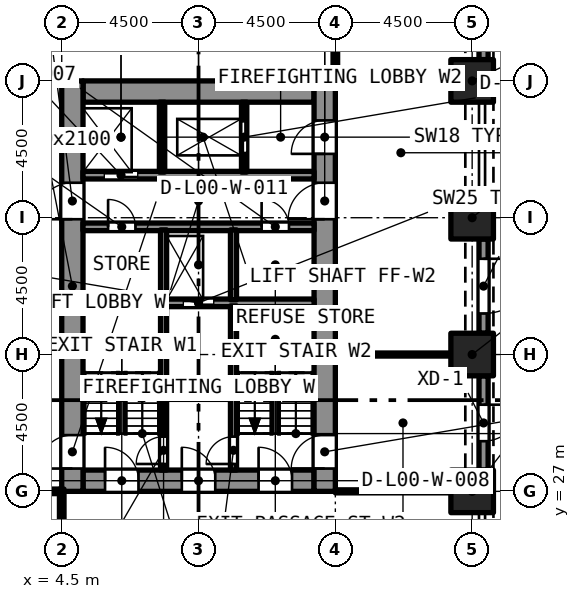
"""IFC4 building model, lengths in metres.
Left out: names, types, materials, properties, quantities, classifications, styles, units other than length and angle.
Written with IfcOpenShell. Run it as: python <this file> out.ifc"""

import sys

from ifc_helpers import new_model, si_unit, direction, frame, frame_2d, origin, origin_2d, place, context, subcontext, project, spatial, rectangle, extrude, element, fill, save


model = new_model("IFC4")
c1 = context("Model", 3, precision=1e-05, world=origin(), true_north=direction((0.0, 1.0)))
c2 = subcontext(c1, "Body", "Model", "MODEL_VIEW")
j1 = project(units=[si_unit("LENGTHUNIT", "METRE"), si_unit("PLANEANGLEUNIT", "RADIAN")], contexts=[c1])
p1 = place(None, origin())
s1 = spatial("IfcSite", under=j1, at=p1, CompositionType="ELEMENT")
p2 = place(p1, origin())
s2 = spatial("IfcBuilding", under=s1, at=p2, CompositionType="ELEMENT")
p3 = place(p2, origin())
s3 = spatial("IfcBuildingStorey", under=s2, at=p3, CompositionType="ELEMENT", Elevation=0.0)
for number, where, z_axis, x_axis in (
    (1, (18.0, 27.0, -0.3), (0.0, 0.0, 1.0), (1.0, 0.0, 0.0)),
    (2, (18.0, 31.5, -0.3), (0.0, 0.0, 1.0), (1.0, 0.0, 0.0)),
    (3, (18.0, 36.0, -0.3), (0.0, 0.0, 1.0), (1.0, 0.0, 0.0)),
    (4, (18.0, 40.5, -0.3), (0.0, 0.0, 1.0), (1.0, 0.0, 0.0)),
):
    element("IfcColumn", number, at=place(p3, frame(where, z_axis=z_axis, x_axis=x_axis)), inside=s3, PredefinedType="COLUMN", context=c2, shape_type="SweptSolid", body=[
        extrude(rectangle(XDim=1.4, YDim=1.4, at=origin_2d()), origin(), (0.0, 0.0, 1.0), 6.3),
    ])
p4 = place(p3, frame((5.2, 27.35, -0.3), z_axis=(0.0, 0.0, 1.0), x_axis=(1.0, 0.0, 0.0)))
e5 = element("IfcWall", 5, at=p4, inside=s3, PredefinedType="SOLIDWALL", context=c2, shape_type="SweptSolid", body=[
    extrude(rectangle(XDim=7.6, YDim=0.7, at=frame_2d((3.8, 0.0))), origin(), (0.0, 0.0, 1.0), 6.3),
])
p5 = place(p4, frame((0.725, 0.0, 0.3)))
e6 = element("IfcOpeningElement", 6, at=p5, cuts=e5, PredefinedType="OPENING", context=c2, shape_type="SweptSolid", body=[
    extrude(rectangle(XDim=1.1, YDim=2.1, at=frame_2d((0.55, 1.05))), frame((0.0, 0.36, 0.0), z_axis=(0.0, -1.0, 0.0), x_axis=(1.0, 0.0, 0.0)), (0.0, 0.0, 1.0), 0.72),
])
p6 = place(p4, frame((3.25, 0.0, 0.3)))
e7 = element("IfcOpeningElement", 7, at=p6, cuts=e5, PredefinedType="OPENING", context=c2, shape_type="SweptSolid", body=[
    extrude(rectangle(XDim=1.1, YDim=2.1, at=frame_2d((0.55, 1.05))), frame((0.0, 0.36, 0.0), z_axis=(0.0, -1.0, 0.0), x_axis=(1.0, 0.0, 0.0)), (0.0, 0.0, 1.0), 0.72),
])
p7 = place(p4, frame((5.775, 0.0, 0.3)))
e8 = element("IfcOpeningElement", 8, at=p7, cuts=e5, PredefinedType="OPENING", context=c2, shape_type="SweptSolid", body=[
    extrude(rectangle(XDim=1.1, YDim=2.1, at=frame_2d((0.55, 1.05))), frame((0.0, 0.36, 0.0), z_axis=(0.0, -1.0, 0.0), x_axis=(1.0, 0.0, 0.0)), (0.0, 0.0, 1.0), 0.72),
])
p8 = place(p3, frame((5.2, 40.15, -0.3), z_axis=(0.0, 0.0, 1.0), x_axis=(1.0, 0.0, 0.0)))
e9 = element("IfcWall", 9, at=p8, inside=s3, PredefinedType="SOLIDWALL", context=c2, shape_type="SweptSolid", body=[
    extrude(rectangle(XDim=7.6, YDim=0.7, at=frame_2d((3.8, 0.0))), origin(), (0.0, 0.0, 1.0), 6.3),
])
p9 = place(p3, frame((4.85, 27.0, -0.3), z_axis=(0.0, 0.0, 1.0), x_axis=(0.0, 1.0, 0.0)))
e10 = element("IfcWall", 10, at=p9, inside=s3, PredefinedType="SOLIDWALL", context=c2, shape_type="SweptSolid", body=[
    extrude(rectangle(XDim=13.5, YDim=0.7, at=frame_2d((6.75, 0.0))), origin(), (0.0, 0.0, 1.0), 6.3),
])
p10 = place(p9, frame((0.75, 0.0, 0.3)))
e11 = element("IfcOpeningElement", 11, at=p10, cuts=e10, PredefinedType="OPENING", context=c2, shape_type="SweptSolid", body=[
    extrude(rectangle(XDim=1.1, YDim=2.1, at=frame_2d((0.55, 1.05))), frame((0.0, 0.36, 0.0), z_axis=(0.0, -1.0, 0.0), x_axis=(1.0, 0.0, 0.0)), (0.0, 0.0, 1.0), 0.72),
])
p11 = place(p9, frame((8.95, 0.0, 0.3)))
e12 = element("IfcOpeningElement", 12, at=p11, cuts=e10, PredefinedType="OPENING", context=c2, shape_type="SweptSolid", body=[
    extrude(rectangle(XDim=1.2, YDim=2.1, at=frame_2d((0.6, 1.05))), frame((0.0, 0.36, 0.0), z_axis=(0.0, -1.0, 0.0), x_axis=(1.0, 0.0, 0.0)), (0.0, 0.0, 1.0), 0.72),
])
p12 = place(p3, frame((13.15, 27.0, -0.3), z_axis=(0.0, 0.0, 1.0), x_axis=(0.0, 1.0, 0.0)))
e13 = element("IfcWall", 13, at=p12, inside=s3, PredefinedType="SOLIDWALL", context=c2, shape_type="SweptSolid", body=[
    extrude(rectangle(XDim=13.5, YDim=0.7, at=frame_2d((6.75, 0.0))), origin(), (0.0, 0.0, 1.0), 6.3),
])
p13 = place(p12, frame((0.75, 0.0, 0.3)))
e14 = element("IfcOpeningElement", 14, at=p13, cuts=e13, PredefinedType="OPENING", context=c2, shape_type="SweptSolid", body=[
    extrude(rectangle(XDim=1.1, YDim=2.1, at=frame_2d((0.55, 1.05))), frame((0.0, 0.36, 0.0), z_axis=(0.0, -1.0, 0.0), x_axis=(1.0, 0.0, 0.0)), (0.0, 0.0, 1.0), 0.72),
])
p14 = place(p12, frame((11.1, 0.0, 0.3)))
e15 = element("IfcOpeningElement", 15, at=p14, cuts=e13, PredefinedType="OPENING", context=c2, shape_type="SweptSolid", body=[
    extrude(rectangle(XDim=1.1, YDim=2.1, at=frame_2d((0.55, 1.05))), frame((0.0, 0.36, 0.0), z_axis=(0.0, -1.0, 0.0), x_axis=(1.0, 0.0, 0.0)), (0.0, 0.0, 1.0), 0.72),
])
p15 = place(p12, frame((8.95, 0.0, 0.3)))
e16 = element("IfcOpeningElement", 16, at=p15, cuts=e13, PredefinedType="OPENING", context=c2, shape_type="SweptSolid", body=[
    extrude(rectangle(XDim=1.2, YDim=2.1, at=frame_2d((0.6, 1.05))), frame((0.0, 0.36, 0.0), z_axis=(0.0, -1.0, 0.0), x_axis=(1.0, 0.0, 0.0)), (0.0, 0.0, 1.0), 0.72),
])
p16 = place(p3, frame((18.375, 30.8, 0.0), z_axis=(0.0, 0.0, 1.0), x_axis=(0.0, -1.0, 0.0)))
e17 = element("IfcWall", 17, at=p16, inside=s3, PredefinedType="SOLIDWALL", context=c2, shape_type="SweptSolid", body=[
    extrude(rectangle(XDim=3.1, YDim=0.3, at=frame_2d((1.55, 0.0))), origin(), (0.0, 0.0, 1.0), 6.0),
])
p17 = place(p16, frame((0.95, 0.0, 0.0)))
e18 = element("IfcOpeningElement", 18, at=p17, cuts=e17, PredefinedType="OPENING", context=c2, shape_type="SweptSolid", body=[
    extrude(rectangle(XDim=1.2, YDim=2.4, at=frame_2d((0.6, 1.2))), frame((0.0, 0.16, 0.0), z_axis=(0.0, -1.0, 0.0), x_axis=(1.0, 0.0, 0.0)), (0.0, 0.0, 1.0), 0.32),
])
p18 = place(p3, frame((18.375, 35.3, 0.0), z_axis=(0.0, 0.0, 1.0), x_axis=(0.0, -1.0, 0.0)))
e19 = element("IfcWall", 19, at=p18, inside=s3, PredefinedType="SOLIDWALL", context=c2, shape_type="SweptSolid", body=[
    extrude(rectangle(XDim=3.1, YDim=0.3, at=frame_2d((1.55, 0.0))), origin(), (0.0, 0.0, 1.0), 6.0),
])
p19 = place(p18, frame((0.65, 0.0, 0.0)))
e20 = element("IfcOpeningElement", 20, at=p19, cuts=e19, PredefinedType="OPENING", context=c2, shape_type="SweptSolid", body=[
    extrude(rectangle(XDim=1.8, YDim=2.4, at=frame_2d((0.9, 1.2))), frame((0.0, 0.16, 0.0), z_axis=(0.0, -1.0, 0.0), x_axis=(1.0, 0.0, 0.0)), (0.0, 0.0, 1.0), 0.32),
])
p20 = place(p3, frame((18.375, 44.3, 0.0), z_axis=(0.0, 0.0, 1.0), x_axis=(0.0, -1.0, 0.0)))
e21 = element("IfcWall", 21, at=p20, inside=s3, PredefinedType="SOLIDWALL", context=c2, shape_type="SweptSolid", body=[
    extrude(rectangle(XDim=3.1, YDim=0.3, at=frame_2d((1.55, 0.0))), origin(), (0.0, 0.0, 1.0), 6.0),
])
p21 = place(p20, frame((0.65, 0.0, 0.0)))
e22 = element("IfcOpeningElement", 22, at=p21, cuts=e21, PredefinedType="OPENING", context=c2, shape_type="SweptSolid", body=[
    extrude(rectangle(XDim=1.8, YDim=2.4, at=frame_2d((0.9, 1.2))), frame((0.0, 0.16, 0.0), z_axis=(0.0, -1.0, 0.0), x_axis=(1.0, 0.0, 0.0)), (0.0, 0.0, 1.0), 0.32),
])
p22 = place(p3, frame((5.2, 33.2, 0.0), z_axis=(0.0, 0.0, 1.0), x_axis=(1.0, 0.0, 0.0)))
e23 = element("IfcWall", 23, at=p22, inside=s3, PredefinedType="SOLIDWALL", context=c2, shape_type="SweptSolid", body=[
    extrude(rectangle(XDim=7.6, YDim=0.25, at=frame_2d((3.8, 0.0))), origin(), (0.0, 0.0, 1.0), 5.65),
])
p23 = place(p22, frame((3.3, 0.0, 0.0)))
e24 = element("IfcOpeningElement", 24, at=p23, cuts=e23, PredefinedType="OPENING", context=c2, shape_type="SweptSolid", body=[
    extrude(rectangle(XDim=1.0, YDim=2.1, at=frame_2d((0.5, 1.05))), frame((0.0, 0.135, 0.0), z_axis=(0.0, -1.0, 0.0), x_axis=(1.0, 0.0, 0.0)), (0.0, 0.0, 1.0), 0.27),
])
p24 = place(p3, frame((5.2, 35.7, 0.0), z_axis=(0.0, 0.0, 1.0), x_axis=(1.0, 0.0, 0.0)))
e25 = element("IfcWall", 25, at=p24, inside=s3, PredefinedType="SOLIDWALL", context=c2, shape_type="SweptSolid", body=[
    extrude(rectangle(XDim=7.6, YDim=0.25, at=frame_2d((3.8, 0.0))), origin(), (0.0, 0.0, 1.0), 5.65),
])
p25 = place(p24, frame((0.825, 0.0, 0.0)))
e26 = element("IfcOpeningElement", 26, at=p25, cuts=e25, PredefinedType="OPENING", context=c2, shape_type="SweptSolid", body=[
    extrude(rectangle(XDim=0.9, YDim=2.1, at=frame_2d((0.45, 1.05))), frame((0.0, 0.135, 0.0), z_axis=(0.0, -1.0, 0.0), x_axis=(1.0, 0.0, 0.0)), (0.0, 0.0, 1.0), 0.27),
])
p26 = place(p24, frame((5.875, 0.0, 0.0)))
e27 = element("IfcOpeningElement", 27, at=p26, cuts=e25, PredefinedType="OPENING", context=c2, shape_type="SweptSolid", body=[
    extrude(rectangle(XDim=0.9, YDim=2.1, at=frame_2d((0.45, 1.05))), frame((0.0, 0.135, 0.0), z_axis=(0.0, -1.0, 0.0), x_axis=(1.0, 0.0, 0.0)), (0.0, 0.0, 1.0), 0.27),
])
p27 = place(p3, frame((5.2, 37.4, 0.0), z_axis=(0.0, 0.0, 1.0), x_axis=(1.0, 0.0, 0.0)))
e28 = element("IfcWall", 28, at=p27, inside=s3, PredefinedType="SOLIDWALL", context=c2, shape_type="SweptSolid", body=[
    extrude(rectangle(XDim=7.6, YDim=0.25, at=frame_2d((3.8, 0.0))), origin(), (0.0, 0.0, 1.0), 5.65),
])
p28 = place(p27, frame((0.7, 0.0, 0.0)))
e29 = element("IfcOpeningElement", 29, at=p28, cuts=e28, PredefinedType="OPENING", context=c2, shape_type="SweptSolid", body=[
    extrude(rectangle(XDim=1.1, YDim=2.4, at=frame_2d((0.55, 1.2))), frame((0.0, 0.135, 0.0), z_axis=(0.0, -1.0, 0.0), x_axis=(1.0, 0.0, 0.0)), (0.0, 0.0, 1.0), 0.27),
])
p29 = place(p3, frame((7.85, 27.7, 0.0), z_axis=(0.0, 0.0, 1.0), x_axis=(0.0, 1.0, 0.0)))
e30 = element("IfcWall", 30, at=p29, inside=s3, PredefinedType="SOLIDWALL", context=c2, shape_type="SweptSolid", body=[
    extrude(rectangle(XDim=5.4, YDim=0.2, at=frame_2d((2.7, 0.0))), origin(), (0.0, 0.0, 1.0), 5.65),
])
p30 = place(p29, frame((0.2, 0.0, 0.0)))
e31 = element("IfcOpeningElement", 31, at=p30, cuts=e30, PredefinedType="OPENING", context=c2, shape_type="SweptSolid", body=[
    extrude(rectangle(XDim=0.9, YDim=2.1, at=frame_2d((0.45, 1.05))), frame((0.0, 0.11, 0.0), z_axis=(0.0, -1.0, 0.0), x_axis=(1.0, 0.0, 0.0)), (0.0, 0.0, 1.0), 0.22),
])
p31 = place(p3, frame((10.15, 27.7, 0.0), z_axis=(0.0, 0.0, 1.0), x_axis=(0.0, 1.0, 0.0)))
e32 = element("IfcWall", 32, at=p31, inside=s3, PredefinedType="SOLIDWALL", context=c2, shape_type="SweptSolid", body=[
    extrude(rectangle(XDim=5.4, YDim=0.2, at=frame_2d((2.7, 0.0))), origin(), (0.0, 0.0, 1.0), 5.65),
])
p32 = place(p31, frame((0.2, 0.0, 0.0)))
e33 = element("IfcOpeningElement", 33, at=p32, cuts=e32, PredefinedType="OPENING", context=c2, shape_type="SweptSolid", body=[
    extrude(rectangle(XDim=0.9, YDim=2.1, at=frame_2d((0.45, 1.05))), frame((0.0, 0.11, 0.0), z_axis=(0.0, -1.0, 0.0), x_axis=(1.0, 0.0, 0.0)), (0.0, 0.0, 1.0), 0.22),
])
for number, where, z_axis, x_axis in (
    (34, (7.85, 33.3, 0.0), (0.0, 0.0, 1.0), (0.0, 1.0, 0.0)),
    (35, (10.15, 33.3, 0.0), (0.0, 0.0, 1.0), (0.0, 1.0, 0.0)),
):
    element("IfcWall", number, at=place(p3, frame(where, z_axis=z_axis, x_axis=x_axis)), inside=s3, PredefinedType="SOLIDWALL", context=c2, shape_type="SweptSolid", body=[
        extrude(rectangle(XDim=2.3, YDim=0.2, at=frame_2d((1.15, 0.0))), origin(), (0.0, 0.0, 1.0), 5.65),
    ])
p33 = place(p3, frame((7.8, 37.5, 0.0), z_axis=(0.0, 0.0, 1.0), x_axis=(0.0, 1.0, 0.0)))
e36 = element("IfcWall", 36, at=p33, inside=s3, PredefinedType="SOLIDWALL", context=c2, shape_type="SweptSolid", body=[
    extrude(rectangle(XDim=2.3, YDim=0.175, at=frame_2d((1.15, 0.0))), origin(), (0.0, 0.0, 1.0), 5.65),
])
p34 = place(p3, frame((10.5, 37.5, 0.0), z_axis=(0.0, 0.0, 1.0), x_axis=(0.0, 1.0, 0.0)))
e37 = element("IfcWall", 37, at=p34, inside=s3, PredefinedType="SOLIDWALL", context=c2, shape_type="SweptSolid", body=[
    extrude(rectangle(XDim=2.3, YDim=0.175, at=frame_2d((1.15, 0.0))), origin(), (0.0, 0.0, 1.0), 5.65),
])
p35 = place(p34, frame((0.65, 0.0, 0.0)))
e38 = element("IfcOpeningElement", 38, at=p35, cuts=e37, PredefinedType="OPENING", context=c2, shape_type="SweptSolid", body=[
    extrude(rectangle(XDim=1.0, YDim=2.1, at=frame_2d((0.5, 1.05))), frame((0.0, 0.097, 0.0), z_axis=(0.0, -1.0, 0.0), x_axis=(1.0, 0.0, 0.0)), (0.0, 0.0, 1.0), 0.195),
])
p36 = place(p3, frame((13.575, 40.5, 0.0), z_axis=(0.0, 0.0, 1.0), x_axis=(1.0, 0.0, 0.0)))
e39 = element("IfcWall", 39, at=p36, inside=s3, PredefinedType="PARTITIONING", context=c2, shape_type="SweptSolid", body=[
    extrude(rectangle(XDim=3.725, YDim=0.15, at=frame_2d((1.863, 0.0))), origin(), (0.0, 0.0, 1.0), 5.65),
])
p37 = place(p3, frame((13.5, 45.0, 0.0), z_axis=(0.0, 0.0, 1.0), x_axis=(0.0, -1.0, 0.0)))
e40 = element("IfcWall", 40, at=p37, inside=s3, PredefinedType="PARTITIONING", context=c2, shape_type="SweptSolid", body=[
    extrude(rectangle(XDim=4.575, YDim=0.15, at=frame_2d((2.288, 0.0))), origin(), (0.0, 0.0, 1.0), 5.65),
])
p38 = place(p37, frame((1.75, 0.0, 0.0)))
e41 = element("IfcOpeningElement", 41, at=p38, cuts=e40, PredefinedType="OPENING", context=c2, shape_type="SweptSolid", body=[
    extrude(rectangle(XDim=1.0, YDim=2.1, at=frame_2d((0.5, 1.05))), frame((0.0, 0.085, 0.0), z_axis=(0.0, -1.0, 0.0), x_axis=(1.0, 0.0, 0.0)), (0.0, 0.0, 1.0), 0.17),
])
p39 = place(p3, frame((4.5, 23.2, 0.0), z_axis=(0.0, 0.0, 1.0), x_axis=(0.0, 1.0, 0.0)))
e42 = element("IfcWall", 42, at=p39, inside=s3, PredefinedType="PARTITIONING", context=c2, shape_type="SweptSolid", body=[
    extrude(rectangle(XDim=3.875, YDim=0.15, at=frame_2d((1.938, 0.0))), origin(), (0.0, 0.0, 1.0), 5.65),
])
p40 = place(p39, frame((1.4, 0.0, 0.0)))
e43 = element("IfcOpeningElement", 43, at=p40, cuts=e42, PredefinedType="OPENING", context=c2, shape_type="SweptSolid", body=[
    extrude(rectangle(XDim=1.0, YDim=2.1, at=frame_2d((0.5, 1.05))), frame((0.0, 0.085, 0.0), z_axis=(0.0, -1.0, 0.0), x_axis=(1.0, 0.0, 0.0)), (0.0, 0.0, 1.0), 0.17),
])
p41 = place(p3, frame((0.7, 27.0, 0.0), z_axis=(0.0, 0.0, 1.0), x_axis=(1.0, 0.0, 0.0)))
e44 = element("IfcWall", 44, at=p41, inside=s3, PredefinedType="PARTITIONING", context=c2, shape_type="SweptSolid", body=[
    extrude(rectangle(XDim=3.725, YDim=0.15, at=frame_2d((1.863, 0.0))), origin(), (0.0, 0.0, 1.0), 5.65),
])
for number, where, z_axis, x_axis in (
    (45, (13.5, 27.0, 0.0), (0.0, 0.0, 1.0), (1.0, 0.0, 0.0)),
    (46, (13.5, 31.5, 0.0), (0.0, 0.0, 1.0), (1.0, 0.0, 0.0)),
    (47, (0.7, 31.5, 0.0), (0.0, 0.0, 1.0), (1.0, 0.0, 0.0)),
):
    element("IfcWall", number, at=place(p3, frame(where, z_axis=z_axis, x_axis=x_axis)), inside=s3, PredefinedType="PARTITIONING", context=c2, shape_type="SweptSolid", body=[
        extrude(rectangle(XDim=3.8, YDim=0.1, at=frame_2d((1.9, 0.0))), origin(), (0.0, 0.0, 1.0), 5.65),
    ])
p42 = place(p17, origin())
e48 = element("IfcDoor", 48, at=p42, inside=s3, OperationType="SINGLE_SWING_LEFT", PredefinedType="DOOR", context=c2, shape_type="SweptSolid", body=[
    extrude(rectangle(XDim=1.2, YDim=2.4, at=frame_2d((0.6, 1.2))), frame((0.0, 0.025, 0.0), z_axis=(0.0, -1.0, 0.0), x_axis=(1.0, 0.0, 0.0)), (0.0, 0.0, 1.0), 0.05),
])
fill(e18, e48)
p43 = place(p19, origin())
e49 = element("IfcDoor", 49, at=p43, inside=s3, OperationType="SINGLE_SWING_LEFT", PredefinedType="DOOR", context=c2, shape_type="SweptSolid", body=[
    extrude(rectangle(XDim=1.8, YDim=2.4, at=frame_2d((0.9, 1.2))), frame((0.0, 0.025, 0.0), z_axis=(0.0, -1.0, 0.0), x_axis=(1.0, 0.0, 0.0)), (0.0, 0.0, 1.0), 0.05),
])
fill(e20, e49)
p44 = place(p30, origin())
e50 = element("IfcDoor", 50, at=p44, inside=s3, OperationType="SINGLE_SWING_LEFT", PredefinedType="DOOR", context=c2, shape_type="SweptSolid", body=[
    extrude(rectangle(XDim=0.9, YDim=2.1, at=frame_2d((0.45, 1.05))), frame((0.0, 0.025, 0.0), z_axis=(0.0, -1.0, 0.0), x_axis=(1.0, 0.0, 0.0)), (0.0, 0.0, 1.0), 0.05),
])
fill(e31, e50)
p45 = place(p32, origin())
e51 = element("IfcDoor", 51, at=p45, inside=s3, OperationType="SINGLE_SWING_LEFT", PredefinedType="DOOR", context=c2, shape_type="SweptSolid", body=[
    extrude(rectangle(XDim=0.9, YDim=2.1, at=frame_2d((0.45, 1.05))), frame((0.0, 0.025, 0.0), z_axis=(0.0, -1.0, 0.0), x_axis=(1.0, 0.0, 0.0)), (0.0, 0.0, 1.0), 0.05),
])
fill(e33, e51)
p46 = place(p28, origin())
e52 = element("IfcDoor", 52, at=p46, inside=s3, OperationType="SLIDING_TO_LEFT", PredefinedType="DOOR", context=c2, shape_type="SweptSolid", body=[
    extrude(rectangle(XDim=1.1, YDim=2.4, at=frame_2d((0.55, 1.2))), frame((0.0, 0.025, 0.0), z_axis=(0.0, -1.0, 0.0), x_axis=(1.0, 0.0, 0.0)), (0.0, 0.0, 1.0), 0.05),
])
fill(e29, e52)
p47 = place(p35, origin())
e53 = element("IfcDoor", 53, at=p47, inside=s3, OperationType="SLIDING_TO_LEFT", PredefinedType="DOOR", context=c2, shape_type="SweptSolid", body=[
    extrude(rectangle(XDim=1.0, YDim=2.1, at=frame_2d((0.5, 1.05))), frame((0.0, 0.025, 0.0), z_axis=(0.0, -1.0, 0.0), x_axis=(1.0, 0.0, 0.0)), (0.0, 0.0, 1.0), 0.05),
])
fill(e38, e53)
p48 = place(p23, origin())
e54 = element("IfcDoor", 54, at=p48, inside=s3, OperationType="SLIDING_TO_LEFT", PredefinedType="DOOR", context=c2, shape_type="SweptSolid", body=[
    extrude(rectangle(XDim=1.0, YDim=2.1, at=frame_2d((0.5, 1.05))), frame((0.0, 0.025, 0.0), z_axis=(0.0, -1.0, 0.0), x_axis=(1.0, 0.0, 0.0)), (0.0, 0.0, 1.0), 0.05),
])
fill(e24, e54)
p49 = place(p25, origin())
e55 = element("IfcDoor", 55, at=p49, inside=s3, OperationType="SINGLE_SWING_LEFT", PredefinedType="DOOR", context=c2, shape_type="SweptSolid", body=[
    extrude(rectangle(XDim=0.9, YDim=2.1, at=frame_2d((0.45, 1.05))), frame((0.0, 0.025, 0.0), z_axis=(0.0, -1.0, 0.0), x_axis=(1.0, 0.0, 0.0)), (0.0, 0.0, 1.0), 0.05),
])
fill(e26, e55)
p50 = place(p26, origin())
e56 = element("IfcDoor", 56, at=p50, inside=s3, OperationType="SINGLE_SWING_LEFT", PredefinedType="DOOR", context=c2, shape_type="SweptSolid", body=[
    extrude(rectangle(XDim=0.9, YDim=2.1, at=frame_2d((0.45, 1.05))), frame((0.0, 0.025, 0.0), z_axis=(0.0, -1.0, 0.0), x_axis=(1.0, 0.0, 0.0)), (0.0, 0.0, 1.0), 0.05),
])
fill(e27, e56)
p51 = place(p5, origin())
e57 = element("IfcDoor", 57, at=p51, inside=s3, OperationType="SINGLE_SWING_LEFT", PredefinedType="DOOR", context=c2, shape_type="SweptSolid", body=[
    extrude(rectangle(XDim=1.1, YDim=2.1, at=frame_2d((0.55, 1.05))), frame((0.0, 0.025, 0.0), z_axis=(0.0, -1.0, 0.0), x_axis=(1.0, 0.0, 0.0)), (0.0, 0.0, 1.0), 0.05),
])
fill(e6, e57)
p52 = place(p6, origin())
e58 = element("IfcDoor", 58, at=p52, inside=s3, OperationType="SINGLE_SWING_LEFT", PredefinedType="DOOR", context=c2, shape_type="SweptSolid", body=[
    extrude(rectangle(XDim=1.1, YDim=2.1, at=frame_2d((0.55, 1.05))), frame((0.0, 0.025, 0.0), z_axis=(0.0, -1.0, 0.0), x_axis=(1.0, 0.0, 0.0)), (0.0, 0.0, 1.0), 0.05),
])
fill(e7, e58)
p53 = place(p7, origin())
e59 = element("IfcDoor", 59, at=p53, inside=s3, OperationType="SINGLE_SWING_LEFT", PredefinedType="DOOR", context=c2, shape_type="SweptSolid", body=[
    extrude(rectangle(XDim=1.1, YDim=2.1, at=frame_2d((0.55, 1.05))), frame((0.0, 0.025, 0.0), z_axis=(0.0, -1.0, 0.0), x_axis=(1.0, 0.0, 0.0)), (0.0, 0.0, 1.0), 0.05),
])
fill(e8, e59)
p54 = place(p10, origin())
e60 = element("IfcDoor", 60, at=p54, inside=s3, OperationType="SINGLE_SWING_LEFT", PredefinedType="DOOR", context=c2, shape_type="SweptSolid", body=[
    extrude(rectangle(XDim=1.1, YDim=2.1, at=frame_2d((0.55, 1.05))), frame((0.0, 0.025, 0.0), z_axis=(0.0, -1.0, 0.0), x_axis=(1.0, 0.0, 0.0)), (0.0, 0.0, 1.0), 0.05),
])
fill(e11, e60)
p55 = place(p13, origin())
e61 = element("IfcDoor", 61, at=p55, inside=s3, OperationType="SINGLE_SWING_LEFT", PredefinedType="DOOR", context=c2, shape_type="SweptSolid", body=[
    extrude(rectangle(XDim=1.1, YDim=2.1, at=frame_2d((0.55, 1.05))), frame((0.0, 0.025, 0.0), z_axis=(0.0, -1.0, 0.0), x_axis=(1.0, 0.0, 0.0)), (0.0, 0.0, 1.0), 0.05),
])
fill(e14, e61)
p56 = place(p14, origin())
e62 = element("IfcDoor", 62, at=p56, inside=s3, OperationType="SINGLE_SWING_LEFT", PredefinedType="DOOR", context=c2, shape_type="SweptSolid", body=[
    extrude(rectangle(XDim=1.1, YDim=2.1, at=frame_2d((0.55, 1.05))), frame((0.0, 0.025, 0.0), z_axis=(0.0, -1.0, 0.0), x_axis=(1.0, 0.0, 0.0)), (0.0, 0.0, 1.0), 0.05),
])
fill(e15, e62)
p57 = place(p11, origin())
e63 = element("IfcDoor", 63, at=p57, inside=s3, OperationType="SINGLE_SWING_LEFT", PredefinedType="DOOR", context=c2, shape_type="SweptSolid", body=[
    extrude(rectangle(XDim=1.2, YDim=2.1, at=frame_2d((0.6, 1.05))), frame((0.0, 0.025, 0.0), z_axis=(0.0, -1.0, 0.0), x_axis=(1.0, 0.0, 0.0)), (0.0, 0.0, 1.0), 0.05),
])
fill(e12, e63)
p58 = place(p15, origin())
e64 = element("IfcDoor", 64, at=p58, inside=s3, OperationType="SINGLE_SWING_LEFT", PredefinedType="DOOR", context=c2, shape_type="SweptSolid", body=[
    extrude(rectangle(XDim=1.2, YDim=2.1, at=frame_2d((0.6, 1.05))), frame((0.0, 0.025, 0.0), z_axis=(0.0, -1.0, 0.0), x_axis=(1.0, 0.0, 0.0)), (0.0, 0.0, 1.0), 0.05),
])
fill(e16, e64)
save(model, sys.argv[1])
